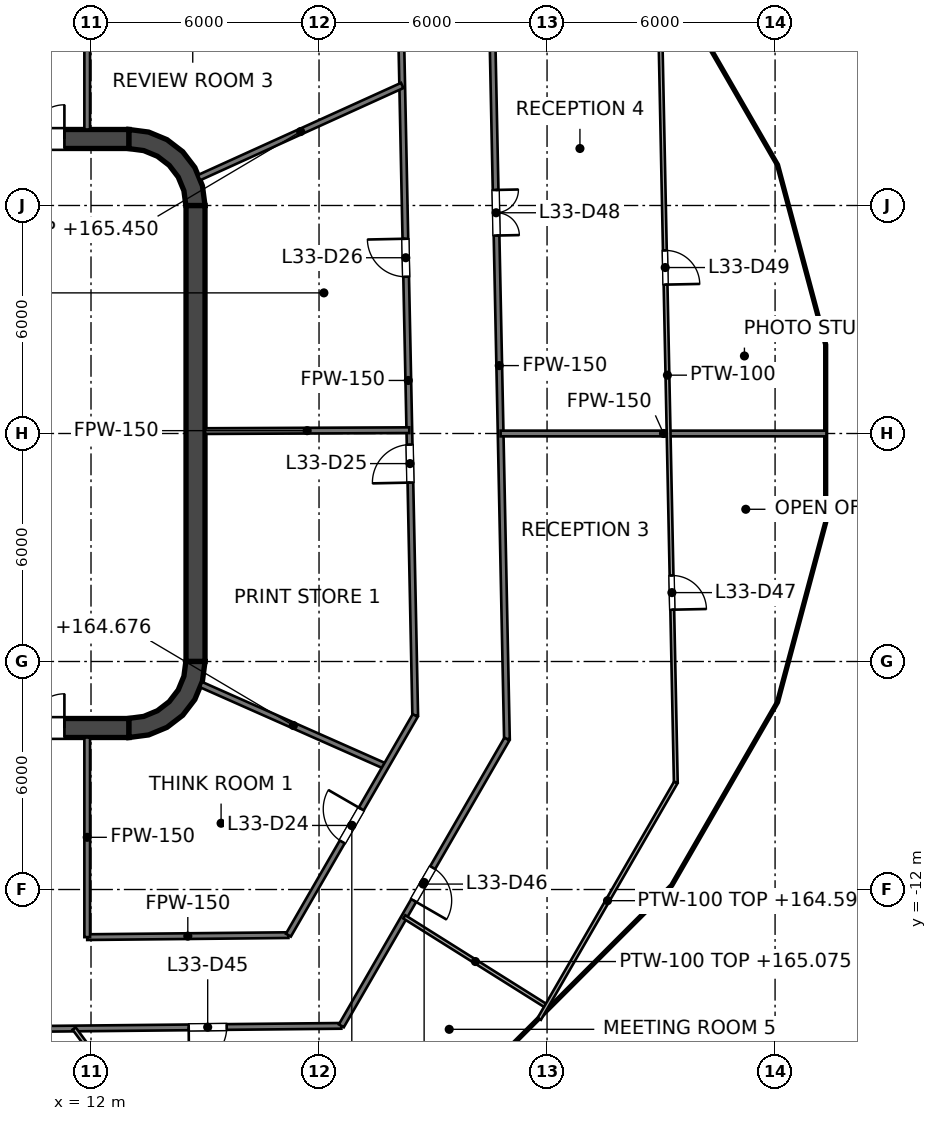
"""IFC4 building model, lengths in metres.
Left out: names, types, materials, properties, quantities, classifications, styles, units other than length and angle.
Written with IfcOpenShell. Run it as: python <this file> out.ifc"""

import sys

from ifc_helpers import new_model, si_unit, direction, frame, frame_2d, origin, place, context, subcontext, project, spatial, polyline, rectangle, outline, extrude, element, fill, save


model = new_model("IFC4")
c1 = context("Model", 3, precision=1e-05, world=origin(), true_north=direction((0.0, 1.0)))
c2 = subcontext(c1, "Body", "Model", "MODEL_VIEW")
j1 = project(units=[si_unit("LENGTHUNIT", "METRE"), si_unit("PLANEANGLEUNIT", "RADIAN")], contexts=[c1])
p1 = place(None, origin())
s1 = spatial("IfcSite", under=j1, at=p1, CompositionType="ELEMENT")
p2 = place(p1, origin())
s2 = spatial("IfcBuilding", under=s1, at=p2, CompositionType="ELEMENT")
p3 = place(p2, frame((0.0, 0.0, 161.6)))
s3 = spatial("IfcBuildingStorey", under=s2, at=p3, CompositionType="ELEMENT", Elevation=161.6)
p4 = place(p3, frame((-13.0, 7.75, 0.0), z_axis=(0.0, 0.0, 1.0), x_axis=(1.0, 0.0, 0.0)))
e1 = element("IfcWall", 1, at=p4, inside=s3, PredefinedType="SHEAR", context=c2, shape_type="SweptSolid", body=[
    extrude(rectangle(XDim=26.0, YDim=0.5, at=frame_2d((13.0, 0.0))), origin(), (0.0, 0.0, 1.0), 4.0),
])
p5 = place(p4, frame((1.7, 0.0, 0.0)))
e2 = element("IfcOpeningElement", 2, at=p5, cuts=e1, PredefinedType="OPENING", context=c2, shape_type="SweptSolid", body=[
    extrude(rectangle(XDim=1.8, YDim=2.1, at=frame_2d((0.9, 1.05))), frame((0.0, 0.25, 0.0), z_axis=(0.0, -1.0, 0.0), x_axis=(1.0, 0.0, 0.0)), (0.0, 0.0, 1.0), 0.5),
])
p6 = place(p4, frame((22.5, 0.0, 0.0)))
e3 = element("IfcOpeningElement", 3, at=p6, cuts=e1, PredefinedType="OPENING", context=c2, shape_type="SweptSolid", body=[
    extrude(rectangle(XDim=1.8, YDim=2.1, at=frame_2d((0.9, 1.05))), frame((0.0, 0.25, 0.0), z_axis=(0.0, -1.0, 0.0), x_axis=(1.0, 0.0, 0.0)), (0.0, 0.0, 1.0), 0.5),
])
p7 = place(p3, frame((-13.0, -7.75, 0.0), z_axis=(0.0, 0.0, 1.0), x_axis=(1.0, 0.0, 0.0)))
e4 = element("IfcWall", 4, at=p7, inside=s3, PredefinedType="SHEAR", context=c2, shape_type="SweptSolid", body=[
    extrude(rectangle(XDim=26.0, YDim=0.5, at=frame_2d((13.0, 0.0))), origin(), (0.0, 0.0, 1.0), 4.0),
])
p8 = place(p7, frame((1.7, 0.0, 0.0)))
e5 = element("IfcOpeningElement", 5, at=p8, cuts=e4, PredefinedType="OPENING", context=c2, shape_type="SweptSolid", body=[
    extrude(rectangle(XDim=1.8, YDim=2.1, at=frame_2d((0.9, 1.05))), frame((0.0, 0.25, 0.0), z_axis=(0.0, -1.0, 0.0), x_axis=(1.0, 0.0, 0.0)), (0.0, 0.0, 1.0), 0.5),
])
p9 = place(p7, frame((22.5, 0.0, 0.0)))
e6 = element("IfcOpeningElement", 6, at=p9, cuts=e4, PredefinedType="OPENING", context=c2, shape_type="SweptSolid", body=[
    extrude(rectangle(XDim=1.8, YDim=2.1, at=frame_2d((0.9, 1.05))), frame((0.0, 0.25, 0.0), z_axis=(0.0, -1.0, 0.0), x_axis=(1.0, 0.0, 0.0)), (0.0, 0.0, 1.0), 0.5),
])
p10 = place(p3, frame((14.75, -6.0, 0.0), z_axis=(0.0, 0.0, 1.0), x_axis=(0.0, 1.0, 0.0)))
e7 = element("IfcWall", 7, at=p10, inside=s3, PredefinedType="SHEAR", context=c2, shape_type="SweptSolid", body=[
    extrude(rectangle(XDim=12.0, YDim=0.5, at=frame_2d((6.0, 0.0))), origin(), (0.0, 0.0, 1.0), 4.0),
])
p11 = place(p3, origin())
e8 = element("IfcWall", 8, at=p11, inside=s3, PredefinedType="SHEAR", context=c2, shape_type="SweptSolid", body=[
    extrude(outline(polyline([(13.0, 8.0), (13.0, 7.496), (13.387, 7.445), (13.748, 7.295), (14.058, 7.058), (14.295, 6.748), (14.445, 6.387), (14.496, 6.0), (15.0, 6.0), (14.932, 6.518), (14.732, 7.0), (14.414, 7.414), (14.0, 7.732), (13.518, 7.932), (13.0, 8.0)])), origin(), (0.0, 0.0, 1.0), 4.0),
])
e9 = element("IfcWall", 9, at=p11, inside=s3, PredefinedType="SHEAR", context=c2, shape_type="SweptSolid", body=[
    extrude(outline(polyline([(15.0, -6.0), (14.496, -6.0), (14.445, -6.387), (14.295, -6.748), (14.058, -7.058), (13.748, -7.295), (13.387, -7.445), (13.0, -7.496), (13.0, -8.0), (13.518, -7.932), (14.0, -7.732), (14.414, -7.414), (14.732, -7.0), (14.932, -6.518), (15.0, -6.0)])), origin(), (0.0, 0.0, 1.0), 4.0),
])
p12 = place(p3, frame((11.8, -7.5, 0.0), z_axis=(0.0, 0.0, 1.0), x_axis=(0.0, 1.0, 0.0)))
e10 = element("IfcWall", 10, at=p12, inside=s3, PredefinedType="SOLIDWALL", context=c2, shape_type="SweptSolid", body=[
    extrude(rectangle(XDim=15.0, YDim=0.4, at=frame_2d((7.5, 0.0))), origin(), (0.0, 0.0, 1.0), 3.85),
])
p13 = place(p12, frame((11.3, 0.0, 0.0)))
e11 = element("IfcOpeningElement", 11, at=p13, cuts=e10, PredefinedType="OPENING", context=c2, shape_type="SweptSolid", body=[
    extrude(rectangle(XDim=1.1, YDim=2.1, at=frame_2d((0.55, 1.05))), frame((0.0, 0.2, 0.0), z_axis=(0.0, -1.0, 0.0), x_axis=(1.0, 0.0, 0.0)), (0.0, 0.0, 1.0), 0.4),
])
p14 = place(p12, frame((8.4, 0.0, 0.0)))
e12 = element("IfcOpeningElement", 12, at=p14, cuts=e10, PredefinedType="OPENING", context=c2, shape_type="SweptSolid", body=[
    extrude(rectangle(XDim=1.1, YDim=2.1, at=frame_2d((0.55, 1.05))), frame((0.0, 0.2, 0.0), z_axis=(0.0, -1.0, 0.0), x_axis=(1.0, 0.0, 0.0)), (0.0, 0.0, 1.0), 0.4),
])
p15 = place(p12, frame((5.5, 0.0, 0.0)))
e13 = element("IfcOpeningElement", 13, at=p15, cuts=e10, PredefinedType="OPENING", context=c2, shape_type="SweptSolid", body=[
    extrude(rectangle(XDim=1.1, YDim=2.1, at=frame_2d((0.55, 1.05))), frame((0.0, 0.2, 0.0), z_axis=(0.0, -1.0, 0.0), x_axis=(1.0, 0.0, 0.0)), (0.0, 0.0, 1.0), 0.4),
])
p16 = place(p12, frame((13.697, 0.0, 0.0)))
e14 = element("IfcOpeningElement", 14, at=p16, cuts=e10, PredefinedType="OPENING", context=c2, shape_type="SweptSolid", body=[
    extrude(rectangle(XDim=0.9, YDim=2.1, at=frame_2d((0.45, 1.05))), frame((0.0, 0.2, 0.0), z_axis=(0.0, -1.0, 0.0), x_axis=(1.0, 0.0, 0.0)), (0.0, 0.0, 1.0), 0.4),
])
p17 = place(p12, frame((0.403, 0.0, 0.0)))
e15 = element("IfcOpeningElement", 15, at=p17, cuts=e10, PredefinedType="OPENING", context=c2, shape_type="SweptSolid", body=[
    extrude(rectangle(XDim=0.9, YDim=2.1, at=frame_2d((0.45, 1.05))), frame((0.0, 0.2, 0.0), z_axis=(0.0, -1.0, 0.0), x_axis=(1.0, 0.0, 0.0)), (0.0, 0.0, 1.0), 0.4),
])
e16 = element("IfcWall", 16, at=p11, inside=s3, PredefinedType="SOLIDWALL", context=c2, shape_type="SweptSolid", body=[
    extrude(outline(polyline([(12.0, -5.675), (12.0, -5.925), (14.25, -5.925), (14.5, -5.925), (14.5, -5.675), (14.5, -3.025), (14.5, -2.775), (14.5, -0.125), (14.5, 0.125), (14.5, 2.775), (14.5, 3.025), (14.5, 5.675), (14.5, 5.925), (14.25, 5.925), (12.0, 5.925), (12.0, 5.675), (14.25, 5.675), (14.25, 3.025), (12.0, 3.025), (12.0, 2.775), (14.25, 2.775), (14.25, 0.125), (12.0, 0.125), (12.0, -0.125), (14.25, -0.125), (14.25, -2.775), (12.0, -2.775), (12.0, -3.025), (14.25, -3.025), (14.25, -5.675), (12.0, -5.675)])), origin(), (0.0, 0.0, 1.0), 3.85),
])
p18 = place(p3, frame((20.167, 10.213, 0.0), z_axis=(0.0, 0.0, 1.0), x_axis=(0.020638567039, -0.999787002091, 0.0)))
e17 = element("IfcWall", 17, at=p18, inside=s3, PredefinedType="PARTITIONING", context=c2, shape_type="SweptSolid", body=[
    extrude(rectangle(XDim=17.637, YDim=0.15, at=frame_2d((8.819, 0.0))), origin(), (0.0, 0.0, 1.0), 2.927),
])
p19 = place(p18, frame((10.507, 0.0, 0.0)))
e18 = element("IfcOpeningElement", 18, at=p19, cuts=e17, PredefinedType="OPENING", context=c2, shape_type="SweptSolid", body=[
    extrude(rectangle(XDim=1.0, YDim=2.1, at=frame_2d((0.5, 1.05))), frame((0.0, 0.075, 0.0), z_axis=(0.0, -1.0, 0.0), x_axis=(1.0, 0.0, 0.0)), (0.0, 0.0, 1.0), 0.15),
])
p20 = place(p18, frame((5.089, 0.0, 0.0)))
e19 = element("IfcOpeningElement", 19, at=p20, cuts=e17, PredefinedType="OPENING", context=c2, shape_type="SweptSolid", body=[
    extrude(rectangle(XDim=1.0, YDim=2.1, at=frame_2d((0.5, 1.05))), frame((0.0, 0.075, 0.0), z_axis=(0.0, -1.0, 0.0), x_axis=(1.0, 0.0, 0.0)), (0.0, 0.0, 1.0), 0.15),
])
p21 = place(p3, frame((22.539, 11.615, 0.0), z_axis=(0.0, 0.0, 1.0), x_axis=(0.020626332176, -0.99978725458, 0.0)))
e20 = element("IfcWall", 20, at=p21, inside=s3, PredefinedType="PARTITIONING", context=c2, shape_type="SweptSolid", body=[
    extrude(rectangle(XDim=19.66, YDim=0.15, at=frame_2d((9.83, 0.0))), origin(), (0.0, 0.0, 1.0), 2.927),
])
p22 = place(p21, frame((5.208, 0.0, 0.0)))
e21 = element("IfcOpeningElement", 21, at=p22, cuts=e20, PredefinedType="OPENING", context=c2, shape_type="SweptSolid", body=[
    extrude(rectangle(XDim=1.2, YDim=2.1, at=frame_2d((0.6, 1.05))), frame((0.0, 0.075, 0.0), z_axis=(0.0, -1.0, 0.0), x_axis=(1.0, 0.0, 0.0)), (0.0, 0.0, 1.0), 0.15),
])
p23 = place(p3, frame((14.895, -6.607, 0.0), z_axis=(0.0, 0.0, 1.0), x_axis=(0.914233271379, -0.405188259337, 0.0)))
e22 = element("IfcWall", 22, at=p23, inside=s3, PredefinedType="PARTITIONING", context=c2, shape_type="SweptSolid", body=[
    extrude(rectangle(XDim=5.317, YDim=0.15, at=frame_2d((2.659, 0.0))), origin(), (0.0, 0.0, 1.0), 3.076),
])
p24 = place(p3, frame((22.778, 0.0, 0.0), z_axis=(0.0, 0.0, 1.0), x_axis=(1.0, 0.0, 0.0)))
e23 = element("IfcWall", 23, at=p24, inside=s3, PredefinedType="PARTITIONING", context=c2, shape_type="SweptSolid", body=[
    extrude(rectangle(XDim=8.574, YDim=0.15, at=frame_2d((4.287, 0.0))), origin(), (0.0, 0.0, 1.0), 2.927),
])
p25 = place(p3, frame((15.0, 0.063, 0.0), z_axis=(0.0, 0.0, 1.0), x_axis=(0.999990294223, 0.004405843865, 0.0)))
e24 = element("IfcWall", 24, at=p25, inside=s3, PredefinedType="PARTITIONING", context=c2, shape_type="SweptSolid", body=[
    extrude(rectangle(XDim=5.375, YDim=0.15, at=frame_2d((2.688, 0.0))), origin(), (0.0, 0.0, 1.0), 2.927),
])
p26 = place(p3, frame((-14.534, -15.916, 0.0), z_axis=(0.0, 0.0, 1.0), x_axis=(0.999950930262, 0.009906415532, 0.0)))
e25 = element("IfcWall", 25, at=p26, inside=s3, PredefinedType="PARTITIONING", context=c2, shape_type="SweptSolid", body=[
    extrude(rectangle(XDim=33.123, YDim=0.15, at=frame_2d((16.561, 0.0))), origin(), (0.0, 0.0, 1.0), 2.927),
])
p27 = place(p26, frame((16.111, 0.0, 0.0)))
e26 = element("IfcOpeningElement", 26, at=p27, cuts=e25, PredefinedType="OPENING", context=c2, shape_type="SweptSolid", body=[
    extrude(rectangle(XDim=1.0, YDim=2.1, at=frame_2d((0.5, 1.05))), frame((0.0, 0.075, 0.0), z_axis=(0.0, -1.0, 0.0), x_axis=(1.0, 0.0, 0.0)), (0.0, 0.0, 1.0), 0.15),
])
p28 = place(p26, frame((21.869, 0.0, 0.0)))
e27 = element("IfcOpeningElement", 27, at=p28, cuts=e25, PredefinedType="OPENING", context=c2, shape_type="SweptSolid", body=[
    extrude(rectangle(XDim=1.0, YDim=2.1, at=frame_2d((0.5, 1.05))), frame((0.0, 0.075, 0.0), z_axis=(0.0, -1.0, 0.0), x_axis=(1.0, 0.0, 0.0)), (0.0, 0.0, 1.0), 0.15),
])
p29 = place(p26, frame((29.106, 0.0, 0.0)))
e28 = element("IfcOpeningElement", 28, at=p29, cuts=e25, PredefinedType="OPENING", context=c2, shape_type="SweptSolid", body=[
    extrude(rectangle(XDim=1.0, YDim=2.1, at=frame_2d((0.5, 1.05))), frame((0.0, 0.075, 0.0), z_axis=(0.0, -1.0, 0.0), x_axis=(1.0, 0.0, 0.0)), (0.0, 0.0, 1.0), 0.15),
])
p30 = place(p3, frame((11.9, -13.253, 0.0), z_axis=(0.0, 0.0, 1.0), x_axis=(0.999951309192, 0.009868092237, 0.0)))
e29 = element("IfcWall", 29, at=p30, inside=s3, PredefinedType="PARTITIONING", context=c2, shape_type="SweptSolid", body=[
    extrude(rectangle(XDim=5.294, YDim=0.15, at=frame_2d((2.647, 0.0))), origin(), (0.0, 0.0, 1.0), 2.927),
])
p31 = place(p3, frame((14.843, 6.733, 0.0), z_axis=(0.0, 0.0, 1.0), x_axis=(0.910628361306, 0.413226315214, 0.0)))
e30 = element("IfcWall", 30, at=p31, inside=s3, PredefinedType="PARTITIONING", context=c2, shape_type="SweptSolid", body=[
    extrude(rectangle(XDim=5.87, YDim=0.15, at=frame_2d((2.935, 0.0))), origin(), (0.0, 0.0, 1.0), 3.85),
])
p32 = place(p3, frame((18.587, -15.587, 0.0), z_axis=(0.0, 0.0, 1.0), x_axis=(0.500026433136, 0.866010142069, 0.0)))
e31 = element("IfcWall", 31, at=p32, inside=s3, PredefinedType="PARTITIONING", context=c2, shape_type="SweptSolid", body=[
    extrude(rectangle(XDim=8.713, YDim=0.15, at=frame_2d((4.357, 0.0))), origin(), (0.0, 0.0, 1.0), 2.995),
])
p33 = place(p32, frame((3.807, 0.0, 0.0)))
e32 = element("IfcOpeningElement", 32, at=p33, cuts=e31, PredefinedType="OPENING", context=c2, shape_type="SweptSolid", body=[
    extrude(rectangle(XDim=1.0, YDim=2.1, at=frame_2d((0.5, 1.05))), frame((0.0, 0.075, 0.0), z_axis=(0.0, -1.0, 0.0), x_axis=(1.0, 0.0, 0.0)), (0.0, 0.0, 1.0), 0.15),
])
p34 = place(p3, frame((17.194, -13.201, 0.0), z_axis=(0.0, 0.0, 1.0), x_axis=(0.499983182885, 0.866035112932, 0.0)))
e33 = element("IfcWall", 33, at=p34, inside=s3, PredefinedType="PARTITIONING", context=c2, shape_type="SweptSolid", body=[
    extrude(rectangle(XDim=6.674, YDim=0.15, at=frame_2d((3.337, 0.0))), origin(), (0.0, 0.0, 1.0), 2.995),
])
p35 = place(p34, frame((2.833, 0.0, 0.0)))
e34 = element("IfcOpeningElement", 34, at=p35, cuts=e33, PredefinedType="OPENING", context=c2, shape_type="SweptSolid", body=[
    extrude(rectangle(XDim=1.0, YDim=2.1, at=frame_2d((0.5, 1.05))), frame((0.0, 0.075, 0.0), z_axis=(0.0, -1.0, 0.0), x_axis=(1.0, 0.0, 0.0)), (0.0, 0.0, 1.0), 0.15),
])
p36 = place(p3, frame((11.9, -13.253, 0.0), z_axis=(0.0, 0.0, 1.0), x_axis=(0.0, 1.0, 0.0)))
e35 = element("IfcWall", 35, at=p36, inside=s3, PredefinedType="PARTITIONING", context=c2, shape_type="SweptSolid", body=[
    extrude(rectangle(XDim=5.253, YDim=0.15, at=frame_2d((2.626, 0.0))), origin(), (0.0, 0.0, 1.0), 2.927),
])
p37 = place(p3, frame((11.9, 8.0, 0.0), z_axis=(0.0, 0.0, 1.0), x_axis=(0.0, 1.0, 0.0)))
e36 = element("IfcWall", 36, at=p37, inside=s3, PredefinedType="PARTITIONING", context=c2, shape_type="SweptSolid", body=[
    extrude(rectangle(XDim=5.479, YDim=0.15, at=frame_2d((2.74, 0.0))), origin(), (0.0, 0.0, 1.0), 2.927),
])
p38 = place(p3, frame((26.947, 12.253, 0.0), z_axis=(0.0, 0.0, 1.0), x_axis=(0.02056465771, -0.999788525066, 0.0)))
e37 = element("IfcWall", 37, at=p38, inside=s3, PredefinedType="PARTITIONING", context=c2, shape_type="SweptSolid", body=[
    extrude(rectangle(XDim=21.441, YDim=0.1, at=frame_2d((10.72, 0.0))), origin(), (0.0, 0.0, 1.0), 2.927),
])
p39 = place(p38, frame((15.993, 0.0, 0.0)))
e38 = element("IfcOpeningElement", 38, at=p39, cuts=e37, PredefinedType="OPENING", context=c2, shape_type="SweptSolid", body=[
    extrude(rectangle(XDim=0.9, YDim=2.1, at=frame_2d((0.45, 1.05))), frame((0.0, 0.05, 0.0), z_axis=(0.0, -1.0, 0.0), x_axis=(1.0, 0.0, 0.0)), (0.0, 0.0, 1.0), 0.1),
])
p40 = place(p38, frame((7.437, 0.0, 0.0)))
e39 = element("IfcOpeningElement", 39, at=p40, cuts=e37, PredefinedType="OPENING", context=c2, shape_type="SweptSolid", body=[
    extrude(rectangle(XDim=0.9, YDim=2.1, at=frame_2d((0.45, 1.05))), frame((0.0, 0.05, 0.0), z_axis=(0.0, -1.0, 0.0), x_axis=(1.0, 0.0, 0.0)), (0.0, 0.0, 1.0), 0.1),
])
p41 = place(p3, frame((11.555, -15.657, 0.0), z_axis=(0.0, 0.0, 1.0), x_axis=(0.593887483444, -0.80454810733, 0.0)))
e40 = element("IfcWall", 40, at=p41, inside=s3, PredefinedType="PARTITIONING", context=c2, shape_type="SweptSolid", body=[
    extrude(rectangle(XDim=5.454, YDim=0.1, at=frame_2d((2.727, 0.0))), origin(), (0.0, 0.0, 1.0), 2.927),
])
p42 = place(p3, frame((20.243, -12.719, 0.0), z_axis=(0.0, 0.0, 1.0), x_axis=(0.846680609893, -0.532101442237, 0.0)))
e41 = element("IfcWall", 41, at=p42, inside=s3, PredefinedType="PARTITIONING", context=c2, shape_type="SweptSolid", body=[
    extrude(rectangle(XDim=4.422, YDim=0.1, at=frame_2d((2.211, 0.0))), origin(), (0.0, 0.0, 1.0), 3.475),
])
p43 = place(p3, frame((23.795, -15.405, 0.0), z_axis=(0.0, 0.0, 1.0), x_axis=(0.50004207551, 0.866001110115, 0.0)))
e42 = element("IfcWall", 42, at=p43, inside=s3, PredefinedType="PARTITIONING", context=c2, shape_type="SweptSolid", body=[
    extrude(rectangle(XDim=7.185, YDim=0.1, at=frame_2d((3.593, 0.0))), origin(), (0.0, 0.0, 1.0), 2.995),
])
p44 = place(p13, origin())
e43 = element("IfcDoor", 43, at=p44, inside=s3, OperationType="DOUBLE_DOOR_SLIDING", PredefinedType="DOOR", context=c2, shape_type="SweptSolid", body=[
    extrude(rectangle(XDim=1.1, YDim=2.1, at=frame_2d((0.55, 1.05))), frame((0.0, 0.025, 0.0), z_axis=(0.0, -1.0, 0.0), x_axis=(1.0, 0.0, 0.0)), (0.0, 0.0, 1.0), 0.05),
])
fill(e11, e43)
p45 = place(p14, origin())
e44 = element("IfcDoor", 44, at=p45, inside=s3, OperationType="DOUBLE_DOOR_SLIDING", PredefinedType="DOOR", context=c2, shape_type="SweptSolid", body=[
    extrude(rectangle(XDim=1.1, YDim=2.1, at=frame_2d((0.55, 1.05))), frame((0.0, 0.025, 0.0), z_axis=(0.0, -1.0, 0.0), x_axis=(1.0, 0.0, 0.0)), (0.0, 0.0, 1.0), 0.05),
])
fill(e12, e44)
p46 = place(p15, origin())
e45 = element("IfcDoor", 45, at=p46, inside=s3, OperationType="DOUBLE_DOOR_SLIDING", PredefinedType="DOOR", context=c2, shape_type="SweptSolid", body=[
    extrude(rectangle(XDim=1.1, YDim=2.1, at=frame_2d((0.55, 1.05))), frame((0.0, 0.025, 0.0), z_axis=(0.0, -1.0, 0.0), x_axis=(1.0, 0.0, 0.0)), (0.0, 0.0, 1.0), 0.05),
])
fill(e13, e45)
p47 = place(p16, origin())
e46 = element("IfcDoor", 46, at=p47, inside=s3, OperationType="SINGLE_SWING_RIGHT", PredefinedType="DOOR", context=c2, shape_type="SweptSolid", body=[
    extrude(rectangle(XDim=0.9, YDim=2.1, at=frame_2d((0.45, 1.05))), frame((0.0, 0.025, 0.0), z_axis=(0.0, -1.0, 0.0), x_axis=(1.0, 0.0, 0.0)), (0.0, 0.0, 1.0), 0.05),
])
fill(e14, e46)
p48 = place(p17, origin())
e47 = element("IfcDoor", 47, at=p48, inside=s3, OperationType="SINGLE_SWING_RIGHT", PredefinedType="DOOR", context=c2, shape_type="SweptSolid", body=[
    extrude(rectangle(XDim=0.9, YDim=2.1, at=frame_2d((0.45, 1.05))), frame((0.0, 0.025, 0.0), z_axis=(0.0, -1.0, 0.0), x_axis=(1.0, 0.0, 0.0)), (0.0, 0.0, 1.0), 0.05),
])
fill(e15, e47)
p49 = place(p6, origin())
e48 = element("IfcDoor", 48, at=p49, inside=s3, OperationType="DOUBLE_DOOR_SINGLE_SWING", PredefinedType="DOOR", context=c2, shape_type="SweptSolid", body=[
    extrude(rectangle(XDim=1.8, YDim=2.1, at=frame_2d((0.9, 1.05))), frame((0.0, 0.025, 0.0), z_axis=(0.0, -1.0, 0.0), x_axis=(1.0, 0.0, 0.0)), (0.0, 0.0, 1.0), 0.05),
])
fill(e3, e48)
p50 = place(p9, origin())
e49 = element("IfcDoor", 49, at=p50, inside=s3, OperationType="DOUBLE_DOOR_SINGLE_SWING", PredefinedType="DOOR", context=c2, shape_type="SweptSolid", body=[
    extrude(rectangle(XDim=1.8, YDim=2.1, at=frame_2d((0.9, 1.05))), frame((0.0, 0.025, 0.0), z_axis=(0.0, -1.0, 0.0), x_axis=(1.0, 0.0, 0.0)), (0.0, 0.0, 1.0), 0.05),
])
fill(e6, e49)
p51 = place(p35, origin())
e50 = element("IfcDoor", 50, at=p51, inside=s3, OperationType="SINGLE_SWING_RIGHT", PredefinedType="DOOR", context=c2, shape_type="SweptSolid", body=[
    extrude(rectangle(XDim=1.0, YDim=2.1, at=frame_2d((0.5, 1.05))), frame((0.0, 0.025, 0.0), z_axis=(0.0, -1.0, 0.0), x_axis=(1.0, 0.0, 0.0)), (0.0, 0.0, 1.0), 0.05),
])
fill(e34, e50)
p52 = place(p19, origin())
e51 = element("IfcDoor", 51, at=p52, inside=s3, OperationType="SINGLE_SWING_RIGHT", PredefinedType="DOOR", context=c2, shape_type="SweptSolid", body=[
    extrude(rectangle(XDim=1.0, YDim=2.1, at=frame_2d((0.5, 1.05))), frame((0.0, 0.025, 0.0), z_axis=(0.0, -1.0, 0.0), x_axis=(1.0, 0.0, 0.0)), (0.0, 0.0, 1.0), 0.05),
])
fill(e18, e51)
p53 = place(p20, origin())
e52 = element("IfcDoor", 52, at=p53, inside=s3, OperationType="SINGLE_SWING_LEFT", PredefinedType="DOOR", context=c2, shape_type="SweptSolid", body=[
    extrude(rectangle(XDim=1.0, YDim=2.1, at=frame_2d((0.5, 1.05))), frame((0.0, 0.025, 0.0), z_axis=(0.0, -1.0, 0.0), x_axis=(1.0, 0.0, 0.0)), (0.0, 0.0, 1.0), 0.05),
])
fill(e19, e52)
p54 = place(p29, origin())
e53 = element("IfcDoor", 53, at=p54, inside=s3, OperationType="SINGLE_SWING_LEFT", PredefinedType="DOOR", context=c2, shape_type="SweptSolid", body=[
    extrude(rectangle(XDim=1.0, YDim=2.1, at=frame_2d((0.5, 1.05))), frame((0.0, 0.025, 0.0), z_axis=(0.0, -1.0, 0.0), x_axis=(1.0, 0.0, 0.0)), (0.0, 0.0, 1.0), 0.05),
])
fill(e28, e53)
p55 = place(p33, origin())
e54 = element("IfcDoor", 54, at=p55, inside=s3, OperationType="SINGLE_SWING_LEFT", PredefinedType="DOOR", context=c2, shape_type="SweptSolid", body=[
    extrude(rectangle(XDim=1.0, YDim=2.1, at=frame_2d((0.5, 1.05))), frame((0.0, 0.025, 0.0), z_axis=(0.0, -1.0, 0.0), x_axis=(1.0, 0.0, 0.0)), (0.0, 0.0, 1.0), 0.05),
])
fill(e32, e54)
p56 = place(p39, origin())
e55 = element("IfcDoor", 55, at=p56, inside=s3, OperationType="SINGLE_SWING_RIGHT", PredefinedType="DOOR", context=c2, shape_type="SweptSolid", body=[
    extrude(rectangle(XDim=0.9, YDim=2.1, at=frame_2d((0.45, 1.05))), frame((0.0, 0.025, 0.0), z_axis=(0.0, -1.0, 0.0), x_axis=(1.0, 0.0, 0.0)), (0.0, 0.0, 1.0), 0.05),
])
fill(e38, e55)
p57 = place(p22, origin())
e56 = element("IfcDoor", 56, at=p57, inside=s3, OperationType="DOUBLE_DOOR_SINGLE_SWING", PredefinedType="DOOR", context=c2, shape_type="SweptSolid", body=[
    extrude(rectangle(XDim=1.2, YDim=2.1, at=frame_2d((0.6, 1.05))), frame((0.0, 0.025, 0.0), z_axis=(0.0, -1.0, 0.0), x_axis=(1.0, 0.0, 0.0)), (0.0, 0.0, 1.0), 0.05),
])
fill(e21, e56)
p58 = place(p40, origin())
e57 = element("IfcDoor", 57, at=p58, inside=s3, OperationType="SINGLE_SWING_RIGHT", PredefinedType="DOOR", context=c2, shape_type="SweptSolid", body=[
    extrude(rectangle(XDim=0.9, YDim=2.1, at=frame_2d((0.45, 1.05))), frame((0.0, 0.025, 0.0), z_axis=(0.0, -1.0, 0.0), x_axis=(1.0, 0.0, 0.0)), (0.0, 0.0, 1.0), 0.05),
])
fill(e39, e57)
save(model, sys.argv[1])
